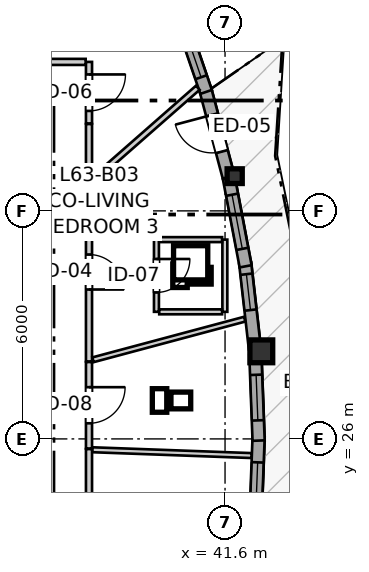
"""IFC4 building model, lengths in metres.
Left out: names, types, materials, properties, quantities, classifications, styles, units other than length and angle.
Written with IfcOpenShell. Run it as: python <this file> out.ifc"""

import sys

from ifc_helpers import new_model, si_unit, direction, frame, frame_2d, origin, origin_2d, place, context, subcontext, project, spatial, rectangle, i_section, extrude, source, transform, mapped, element, fill, save


model = new_model("IFC4")
c1 = context("Model", 3, precision=1e-05, world=origin(), true_north=direction((0.0, 1.0)))
c2 = subcontext(c1, "Body", "Model", "MODEL_VIEW")
j1 = project(units=[si_unit("LENGTHUNIT", "METRE"), si_unit("PLANEANGLEUNIT", "RADIAN")], contexts=[c1])
p1 = place(None, origin())
s1 = spatial("IfcSite", under=j1, at=p1, CompositionType="ELEMENT")
p2 = place(p1, origin())
s2 = spatial("IfcBuilding", under=s1, at=p2, CompositionType="ELEMENT")
p3 = place(p2, frame((0.0, 0.0, 211.6)))
s3 = spatial("IfcBuildingStorey", under=s2, at=p3, CompositionType="ELEMENT", Elevation=211.6)
m1 = source(origin(), c2, "Body", "SweptSolid", [
    extrude(rectangle(XDim=0.6, YDim=0.6, at=origin_2d()), origin(), (0.0, 0.0, 1.0), 2.96),
])
p4 = place(p3, frame((42.554, 28.304, 0.0), z_axis=(0.0, 0.0, 1.0), x_axis=(1.0, 0.0, 0.0)))
e1 = element("IfcColumn", 1, at=p4, inside=s3, PredefinedType="COLUMN", context=c2, shape_type="MappedRepresentation", body=[
    mapped(m1, transform((0.0, 0.0, 0.0), x_axis=(1.0, 0.0, 0.0), y_axis=(0.0, 1.0, 0.0), z_axis=(0.0, 0.0, 1.0), scale=1.0)),
])
m2 = source(origin(), c2, "Body", "SweptSolid", [
    extrude(i_section(OverallWidth=0.398, OverallDepth=0.387, WebThickness=0.019, FlangeThickness=0.03, FilletRadius=0.015, at=origin_2d()), origin(), (0.0, 0.0, 1.0), 2.96),
])
p5 = place(p3, frame((41.854, 32.914, 0.0), z_axis=(0.0, 0.0, 1.0), x_axis=(1.0, 0.0, 0.0)))
e2 = element("IfcColumn", 2, at=p5, inside=s3, PredefinedType="PILASTER", context=c2, shape_type="MappedRepresentation", body=[
    mapped(m2, transform((0.0, 0.0, 0.0), x_axis=(1.0, 0.0, 0.0), y_axis=(0.0, 1.0, 0.0), z_axis=(0.0, 0.0, 1.0), scale=1.0)),
])
p6 = place(p3, frame((42.395, 23.722, 0.0), z_axis=(0.0, 0.0, 1.0), x_axis=(0.038025668885, 0.999276762717, 0.0)))
e3 = element("IfcWall", 3, at=p6, inside=s3, PredefinedType="SOLIDWALL", context=c2, shape_type="SweptSolid", body=[
    extrude(rectangle(XDim=2.324, YDim=0.32, at=frame_2d((1.162, 0.0))), origin(), (0.0, 0.0, 1.0), 2.58),
])
p7 = place(p6, frame((0.312, 0.0, 0.82)))
e4 = element("IfcOpeningElement", 4, at=p7, cuts=e3, PredefinedType="OPENING", context=c2, shape_type="SweptSolid", body=[
    extrude(rectangle(XDim=1.35, YDim=1.45, at=frame_2d((0.675, 0.725))), frame((0.0, 0.17, 0.0), z_axis=(0.0, -1.0, 0.0), x_axis=(1.0, 0.0, 0.0)), (0.0, 0.0, 1.0), 0.34),
])
p8 = place(p3, frame((42.483, 25.956, 0.0), z_axis=(0.0, 0.0, 1.0), x_axis=(-0.038013039165, 0.999277243238, 0.0)))
e5 = element("IfcWall", 5, at=p8, inside=s3, PredefinedType="SOLIDWALL", context=c2, shape_type="SweptSolid", body=[
    extrude(rectangle(XDim=2.254, YDim=0.32, at=frame_2d((1.127, 0.0))), origin(), (0.0, 0.0, 1.0), 2.58),
])
p9 = place(p8, frame((0.532, 0.0, 0.82)))
e6 = element("IfcOpeningElement", 6, at=p9, cuts=e5, PredefinedType="OPENING", context=c2, shape_type="SweptSolid", body=[
    extrude(rectangle(XDim=1.2, YDim=1.45, at=frame_2d((0.6, 0.725))), frame((0.0, 0.17, 0.0), z_axis=(0.0, -1.0, 0.0), x_axis=(1.0, 0.0, 0.0)), (0.0, 0.0, 1.0), 0.34),
])
p10 = place(p3, frame((42.385, 28.376, 0.0), z_axis=(0.0, 0.0, 1.0), x_axis=(-0.113267221285, 0.993564560853, 0.0)))
e7 = element("IfcWall", 7, at=p10, inside=s3, PredefinedType="SOLIDWALL", context=c2, shape_type="SweptSolid", body=[
    extrude(rectangle(XDim=2.268, YDim=0.32, at=frame_2d((1.134, 0.0))), origin(), (0.0, 0.0, 1.0), 2.58),
])
p11 = place(p10, frame((1.021, 0.0, 0.82)))
e8 = element("IfcOpeningElement", 8, at=p11, cuts=e7, PredefinedType="OPENING", context=c2, shape_type="SweptSolid", body=[
    extrude(rectangle(XDim=0.95, YDim=1.35, at=frame_2d((0.475, 0.675))), frame((0.0, 0.17, 0.0), z_axis=(0.0, -1.0, 0.0), x_axis=(1.0, 0.0, 0.0)), (0.0, 0.0, 1.0), 0.34),
])
p12 = place(p3, frame((42.141, 30.542, 0.0), z_axis=(0.0, 0.0, 1.0), x_axis=(-0.186632734065, 0.982429754525, 0.0)))
e9 = element("IfcWall", 9, at=p12, inside=s3, PredefinedType="SOLIDWALL", context=c2, shape_type="SweptSolid", body=[
    extrude(rectangle(XDim=2.364, YDim=0.32, at=frame_2d((1.182, 0.0))), origin(), (0.0, 0.0, 1.0), 2.58),
])
p13 = place(p12, frame((0.467, 0.0, 0.82)))
e10 = element("IfcOpeningElement", 10, at=p13, cuts=e9, PredefinedType="OPENING", context=c2, shape_type="SweptSolid", body=[
    extrude(rectangle(XDim=1.45, YDim=1.25, at=frame_2d((0.725, 0.625))), frame((0.0, 0.17, 0.0), z_axis=(0.0, -1.0, 0.0), x_axis=(1.0, 0.0, 0.0)), (0.0, 0.0, 1.0), 0.34),
])
p14 = place(p3, frame((41.694, 32.892, 0.0), z_axis=(0.0, 0.0, 1.0), x_axis=(-0.257068132003, 0.966393282007, 0.0)))
e11 = element("IfcWall", 11, at=p14, inside=s3, PredefinedType="SOLIDWALL", context=c2, shape_type="SweptSolid", body=[
    extrude(rectangle(XDim=2.403, YDim=0.32, at=frame_2d((1.201, 0.0))), origin(), (0.0, 0.0, 1.0), 2.58),
])
p15 = place(p14, frame((0.691, 0.0, 0.0)))
e12 = element("IfcOpeningElement", 12, at=p15, cuts=e11, PredefinedType="OPENING", context=c2, shape_type="SweptSolid", body=[
    extrude(rectangle(XDim=1.0, YDim=2.1, at=frame_2d((0.5, 1.05))), frame((0.0, 0.17, 0.0), z_axis=(0.0, -1.0, 0.0), x_axis=(1.0, 0.0, 0.0)), (0.0, 0.0, 1.0), 0.34),
])
p16 = place(p3, frame((41.102, 35.13, 0.0), z_axis=(0.0, 0.0, 1.0), x_axis=(-0.323685265908, 0.946164810503, 0.0)))
e13 = element("IfcWall", 13, at=p16, inside=s3, PredefinedType="SOLIDWALL", context=c2, shape_type="SweptSolid", body=[
    extrude(rectangle(XDim=2.384, YDim=0.32, at=frame_2d((1.192, 0.0))), origin(), (0.0, 0.0, 1.0), 2.58),
])
p17 = place(p16, frame((0.408, 0.0, 0.82)))
e14 = element("IfcOpeningElement", 14, at=p17, cuts=e13, PredefinedType="OPENING", context=c2, shape_type="SweptSolid", body=[
    extrude(rectangle(XDim=1.6, YDim=1.35, at=frame_2d((0.8, 0.675))), frame((0.0, 0.17, 0.0), z_axis=(0.0, -1.0, 0.0), x_axis=(1.0, 0.0, 0.0)), (0.0, 0.0, 1.0), 0.34),
])
p18 = place(p3, frame((38.02, 32.748, 0.0), z_axis=(0.0, 0.0, 1.0), x_axis=(0.0, -1.0, 0.0)))
e15 = element("IfcWall", 15, at=p18, inside=s3, PredefinedType="PARTITIONING", context=c2, shape_type="SweptSolid", body=[
    extrude(rectangle(XDim=4.71, YDim=0.16, at=frame_2d((2.355, 0.0))), origin(), (0.0, 0.0, 1.0), 2.628),
])
p19 = place(p18, frame((1.897, 0.0, 0.0)))
e16 = element("IfcOpeningElement", 16, at=p19, cuts=e15, PredefinedType="OPENING", context=c2, shape_type="SweptSolid", body=[
    extrude(rectangle(XDim=0.92, YDim=2.1, at=frame_2d((0.46, 1.05))), frame((0.0, 0.09, 0.0), z_axis=(0.0, -1.0, 0.0), x_axis=(1.0, 0.0, 0.0)), (0.0, 0.0, 1.0), 0.18),
])
p20 = place(p3, frame((38.02, 25.733, 0.0), z_axis=(0.0, 0.0, 1.0), x_axis=(0.0, -1.0, 0.0)))
e17 = element("IfcWall", 17, at=p20, inside=s3, PredefinedType="PARTITIONING", context=c2, shape_type="SweptSolid", body=[
    extrude(rectangle(XDim=3.862, YDim=0.16, at=frame_2d((1.931, 0.0))), origin(), (0.0, 0.0, 1.0), 2.96),
])
p21 = place(p20, frame((1.47, 0.0, 0.0)))
e18 = element("IfcOpeningElement", 18, at=p21, cuts=e17, PredefinedType="OPENING", context=c2, shape_type="SweptSolid", body=[
    extrude(rectangle(XDim=0.92, YDim=2.1, at=frame_2d((0.46, 1.05))), frame((0.0, 0.09, 0.0), z_axis=(0.0, -1.0, 0.0), x_axis=(1.0, 0.0, 0.0)), (0.0, 0.0, 1.0), 0.18),
])
p22 = place(p3, frame((38.02, 28.023, 0.0), z_axis=(0.0, 0.0, 1.0), x_axis=(0.0, -1.0, 0.0)))
e19 = element("IfcWall", 19, at=p22, inside=s3, PredefinedType="PARTITIONING", context=c2, shape_type="SweptSolid", body=[
    extrude(rectangle(XDim=2.275, YDim=0.16, at=frame_2d((1.137, 0.0))), origin(), (0.0, 0.0, 1.0), 2.96),
])
p23 = place(p22, frame((0.662, 0.0, 0.0)))
e20 = element("IfcOpeningElement", 20, at=p23, cuts=e19, PredefinedType="OPENING", context=c2, shape_type="SweptSolid", body=[
    extrude(rectangle(XDim=0.95, YDim=2.1, at=frame_2d((0.475, 1.05))), frame((0.0, 0.09, 0.0), z_axis=(0.0, -1.0, 0.0), x_axis=(1.0, 0.0, 0.0)), (0.0, 0.0, 1.0), 0.18),
])
p24 = place(p3, frame((39.795, 31.244, 0.0), z_axis=(0.0, 0.0, 1.0), x_axis=(0.0, -1.0, 0.0)))
e21 = element("IfcWall", 21, at=p24, inside=s3, PredefinedType="PARTITIONING", context=c2, shape_type="SweptSolid", body=[
    extrude(rectangle(XDim=1.9, YDim=0.13, at=frame_2d((0.95, 0.0))), origin(), (0.0, 0.0, 1.0), 2.598),
])
p25 = place(p24, frame((0.51, 0.0, 0.0)))
e22 = element("IfcOpeningElement", 22, at=p25, cuts=e21, PredefinedType="OPENING", context=c2, shape_type="SweptSolid", body=[
    extrude(rectangle(XDim=0.88, YDim=2.05, at=frame_2d((0.44, 1.025))), frame((0.0, 0.075, 0.0), z_axis=(0.0, -1.0, 0.0), x_axis=(1.0, 0.0, 0.0)), (0.0, 0.0, 1.0), 0.15),
])
p26 = place(p3, frame((38.02, 35.92, 0.0), z_axis=(0.0, 0.0, 1.0), x_axis=(0.0, -1.0, 0.0)))
e23 = element("IfcWall", 23, at=p26, inside=s3, PredefinedType="PARTITIONING", context=c2, shape_type="SweptSolid", body=[
    extrude(rectangle(XDim=1.62, YDim=0.16, at=frame_2d((0.81, 0.0))), origin(), (0.0, 0.0, 1.0), 2.628),
])
p27 = place(p26, frame((0.33, 0.0, 0.0)))
e24 = element("IfcOpeningElement", 24, at=p27, cuts=e23, PredefinedType="OPENING", context=c2, shape_type="SweptSolid", body=[
    extrude(rectangle(XDim=0.96, YDim=2.1, at=frame_2d((0.48, 1.05))), frame((0.0, 0.09, 0.0), z_axis=(0.0, -1.0, 0.0), x_axis=(1.0, 0.0, 0.0)), (0.0, 0.0, 1.0), 0.18),
])
p28 = place(p3, frame((36.242, 36.044, 0.0), z_axis=(0.0, 0.0, 1.0), x_axis=(0.50599508157, 0.862536362959, 0.0)))
e25 = element("IfcWall", 25, at=p28, inside=s3, PredefinedType="PARTITIONING", context=c2, shape_type="SweptSolid", body=[
    extrude(rectangle(XDim=5.456, YDim=0.145, at=frame_2d((2.728, 0.0))), origin(), (0.0, 0.0, 1.0), 2.96),
])
p29 = place(p3, frame((38.11, 25.715, 0.0), z_axis=(0.0, 0.0, 1.0), x_axis=(0.99933433165, -0.036481414253, 0.0)))
e26 = element("IfcWall", 26, at=p29, inside=s3, PredefinedType="PARTITIONING", context=c2, shape_type="SweptSolid", body=[
    extrude(rectangle(XDim=4.189, YDim=0.13, at=frame_2d((2.095, 0.0))), origin(), (0.0, 0.0, 1.0), 2.96),
])
p30 = place(p3, frame((38.125, 28.082, 0.0), z_axis=(0.0, 0.0, 1.0), x_axis=(0.965997321458, 0.258552073934, 0.0)))
e27 = element("IfcWall", 27, at=p30, inside=s3, PredefinedType="PARTITIONING", context=c2, shape_type="SweptSolid", body=[
    extrude(rectangle(XDim=4.134, YDim=0.13, at=frame_2d((2.067, 0.0))), origin(), (0.0, 0.0, 1.0), 2.96),
])
p31 = place(p3, frame((38.154, 32.845, 0.0), z_axis=(0.0, 0.0, 1.0), x_axis=(0.751793032372, 0.659399148071, 0.0)))
e28 = element("IfcWall", 28, at=p31, inside=s3, PredefinedType="PARTITIONING", context=c2, shape_type="SweptSolid", body=[
    extrude(rectangle(XDim=3.631, YDim=0.145, at=frame_2d((1.815, 0.0))), origin(), (0.0, 0.0, 1.0), 2.96),
])
p32 = place(p3, frame((41.595, 29.344, 0.0), z_axis=(0.0, 0.0, 1.0), x_axis=(0.0, 1.0, 0.0)))
e29 = element("IfcWall", 29, at=p32, inside=s3, PredefinedType="PARTITIONING", context=c2, shape_type="SweptSolid", body=[
    extrude(rectangle(XDim=1.9, YDim=0.13, at=frame_2d((0.95, 0.0))), origin(), (0.0, 0.0, 1.0), 2.96),
])
for number, where, z_axis, x_axis in (
    (30, (39.868, 31.244, 0.0), (0.0, 0.0, 1.0), (1.0, 0.0, 0.0)),
    (31, (39.868, 29.344, 0.0), (0.0, 0.0, 1.0), (1.0, 0.0, 0.0)),
):
    element("IfcWall", number, at=place(p3, frame(where, z_axis=z_axis, x_axis=x_axis)), inside=s3, PredefinedType="PARTITIONING", context=c2, shape_type="SweptSolid", body=[
        extrude(rectangle(XDim=1.654, YDim=0.13, at=frame_2d((0.827, 0.0))), origin(), (0.0, 0.0, 1.0), 2.96),
    ])
p33 = place(p3, frame((36.4, 35.92, 0.0), z_axis=(0.0, 0.0, 1.0), x_axis=(1.0, 0.0, 0.0)))
e32 = element("IfcWall", 32, at=p33, inside=s3, PredefinedType="PARTITIONING", context=c2, shape_type="SweptSolid", body=[
    extrude(rectangle(XDim=1.532, YDim=0.16, at=frame_2d((0.766, 0.0))), origin(), (0.0, 0.0, 1.0), 2.96),
])
p34 = place(p3, frame((38.02, 32.938, 0.0), z_axis=(0.0, 0.0, 1.0), x_axis=(0.0, 1.0, 0.0)))
e33 = element("IfcWall", 33, at=p34, inside=s3, PredefinedType="PARTITIONING", context=c2, shape_type="SweptSolid", body=[
    extrude(rectangle(XDim=1.347, YDim=0.16, at=frame_2d((0.674, 0.0))), origin(), (0.0, 0.0, 1.0), 2.628),
])
m3 = source(origin(), c2, "Body", "SweptSolid", [
    extrude(rectangle(XDim=1.35, YDim=1.45, at=frame_2d((0.675, 0.725))), frame((0.0, 0.03, 0.0), z_axis=(0.0, -1.0, 0.0), x_axis=(1.0, 0.0, 0.0)), (0.0, 0.0, 1.0), 0.06),
])
p35 = place(p7, origin())
e34 = element("IfcWindow", 34, at=p35, inside=s3, PartitioningType="SINGLE_PANEL", PredefinedType="WINDOW", context=c2, shape_type="MappedRepresentation", body=[
    mapped(m3, transform((0.0, 0.0, 0.0), x_axis=(1.0, 0.0, 0.0), y_axis=(0.0, 1.0, 0.0), z_axis=(0.0, 0.0, 1.0), scale=1.0)),
])
fill(e4, e34)
m4 = source(origin(), c2, "Body", "SweptSolid", [
    extrude(rectangle(XDim=1.2, YDim=1.45, at=frame_2d((0.6, 0.725))), frame((0.0, 0.03, 0.0), z_axis=(0.0, -1.0, 0.0), x_axis=(1.0, 0.0, 0.0)), (0.0, 0.0, 1.0), 0.06),
])
p36 = place(p9, origin())
e35 = element("IfcWindow", 35, at=p36, inside=s3, PartitioningType="SINGLE_PANEL", PredefinedType="WINDOW", context=c2, shape_type="MappedRepresentation", body=[
    mapped(m4, transform((0.0, 0.0, 0.0), x_axis=(1.0, 0.0, 0.0), y_axis=(0.0, 1.0, 0.0), z_axis=(0.0, 0.0, 1.0), scale=1.0)),
])
fill(e6, e35)
m5 = source(origin(), c2, "Body", "SweptSolid", [
    extrude(rectangle(XDim=0.95, YDim=1.35, at=frame_2d((0.475, 0.675))), frame((0.0, 0.03, 0.0), z_axis=(0.0, -1.0, 0.0), x_axis=(1.0, 0.0, 0.0)), (0.0, 0.0, 1.0), 0.06),
])
p37 = place(p11, origin())
e36 = element("IfcWindow", 36, at=p37, inside=s3, PartitioningType="SINGLE_PANEL", PredefinedType="WINDOW", context=c2, shape_type="MappedRepresentation", body=[
    mapped(m5, transform((0.0, 0.0, 0.0), x_axis=(1.0, 0.0, 0.0), y_axis=(0.0, 1.0, 0.0), z_axis=(0.0, 0.0, 1.0), scale=1.0)),
])
fill(e8, e36)
m6 = source(origin(), c2, "Body", "SweptSolid", [
    extrude(rectangle(XDim=1.45, YDim=1.25, at=frame_2d((0.725, 0.625))), frame((0.0, 0.03, 0.0), z_axis=(0.0, -1.0, 0.0), x_axis=(1.0, 0.0, 0.0)), (0.0, 0.0, 1.0), 0.06),
])
p38 = place(p13, origin())
e37 = element("IfcWindow", 37, at=p38, inside=s3, PartitioningType="SINGLE_PANEL", PredefinedType="WINDOW", context=c2, shape_type="MappedRepresentation", body=[
    mapped(m6, transform((0.0, 0.0, 0.0), x_axis=(1.0, 0.0, 0.0), y_axis=(0.0, 1.0, 0.0), z_axis=(0.0, 0.0, 1.0), scale=1.0)),
])
fill(e10, e37)
m7 = source(origin(), c2, "Body", "SweptSolid", [
    extrude(rectangle(XDim=1.0, YDim=2.1, at=frame_2d((0.5, 1.05))), frame((0.0, 0.025, 0.0), z_axis=(0.0, -1.0, 0.0), x_axis=(1.0, 0.0, 0.0)), (0.0, 0.0, 1.0), 0.05),
])
p39 = place(p15, origin())
e38 = element("IfcDoor", 38, at=p39, inside=s3, OperationType="SINGLE_SWING_RIGHT", PredefinedType="DOOR", context=c2, shape_type="MappedRepresentation", body=[
    mapped(m7, transform((0.0, 0.0, 0.0), x_axis=(1.0, 0.0, 0.0), y_axis=(0.0, 1.0, 0.0), z_axis=(0.0, 0.0, 1.0), scale=1.0)),
])
fill(e12, e38)
m8 = source(origin(), c2, "Body", "SweptSolid", [
    extrude(rectangle(XDim=1.6, YDim=1.35, at=frame_2d((0.8, 0.675))), frame((0.0, 0.03, 0.0), z_axis=(0.0, -1.0, 0.0), x_axis=(1.0, 0.0, 0.0)), (0.0, 0.0, 1.0), 0.06),
])
p40 = place(p17, origin())
e39 = element("IfcWindow", 39, at=p40, inside=s3, PartitioningType="SINGLE_PANEL", PredefinedType="WINDOW", context=c2, shape_type="MappedRepresentation", body=[
    mapped(m8, transform((0.0, 0.0, 0.0), x_axis=(1.0, 0.0, 0.0), y_axis=(0.0, 1.0, 0.0), z_axis=(0.0, 0.0, 1.0), scale=1.0)),
])
fill(e14, e39)
m9 = source(origin(), c2, "Body", "SweptSolid", [
    extrude(rectangle(XDim=0.92, YDim=2.1, at=frame_2d((0.46, 1.05))), frame((0.0, 0.025, 0.0), z_axis=(0.0, -1.0, 0.0), x_axis=(1.0, 0.0, 0.0)), (0.0, 0.0, 1.0), 0.05),
])
p41 = place(p19, origin())
e40 = element("IfcDoor", 40, at=p41, inside=s3, OperationType="SINGLE_SWING_RIGHT", PredefinedType="DOOR", context=c2, shape_type="MappedRepresentation", body=[
    mapped(m9, transform((0.0, 0.0, 0.0), x_axis=(1.0, 0.0, 0.0), y_axis=(0.0, 1.0, 0.0), z_axis=(0.0, 0.0, 1.0), scale=1.0)),
])
fill(e16, e40)
m10 = source(origin(), c2, "Body", "SweptSolid", [
    extrude(rectangle(XDim=0.95, YDim=2.1, at=frame_2d((0.475, 1.05))), frame((0.0, 0.025, 0.0), z_axis=(0.0, -1.0, 0.0), x_axis=(1.0, 0.0, 0.0)), (0.0, 0.0, 1.0), 0.05),
])
p42 = place(p23, origin())
e41 = element("IfcDoor", 41, at=p42, inside=s3, OperationType="SINGLE_SWING_LEFT", PredefinedType="DOOR", context=c2, shape_type="MappedRepresentation", body=[
    mapped(m10, transform((0.0, 0.0, 0.0), x_axis=(1.0, 0.0, 0.0), y_axis=(0.0, 1.0, 0.0), z_axis=(0.0, 0.0, 1.0), scale=1.0)),
])
fill(e20, e41)
m11 = source(origin(), c2, "Body", "SweptSolid", [
    extrude(rectangle(XDim=0.88, YDim=2.05, at=frame_2d((0.44, 1.025))), frame((0.0, 0.025, 0.0), z_axis=(0.0, -1.0, 0.0), x_axis=(1.0, 0.0, 0.0)), (0.0, 0.0, 1.0), 0.05),
])
p43 = place(p25, origin())
e42 = element("IfcDoor", 42, at=p43, inside=s3, OperationType="SINGLE_SWING_LEFT", PredefinedType="DOOR", context=c2, shape_type="MappedRepresentation", body=[
    mapped(m11, transform((0.0, 0.0, 0.0), x_axis=(1.0, 0.0, 0.0), y_axis=(0.0, 1.0, 0.0), z_axis=(0.0, 0.0, 1.0), scale=1.0)),
])
fill(e22, e42)
m12 = source(origin(), c2, "Body", "SweptSolid", [
    extrude(rectangle(XDim=0.96, YDim=2.1, at=frame_2d((0.48, 1.05))), frame((0.0, 0.025, 0.0), z_axis=(0.0, -1.0, 0.0), x_axis=(1.0, 0.0, 0.0)), (0.0, 0.0, 1.0), 0.05),
])
p44 = place(p27, origin())
e43 = element("IfcDoor", 43, at=p44, inside=s3, OperationType="SINGLE_SWING_LEFT", PredefinedType="DOOR", context=c2, shape_type="MappedRepresentation", body=[
    mapped(m12, transform((0.0, 0.0, 0.0), x_axis=(1.0, 0.0, 0.0), y_axis=(0.0, 1.0, 0.0), z_axis=(0.0, 0.0, 1.0), scale=1.0)),
])
fill(e24, e43)
save(model, sys.argv[1])
